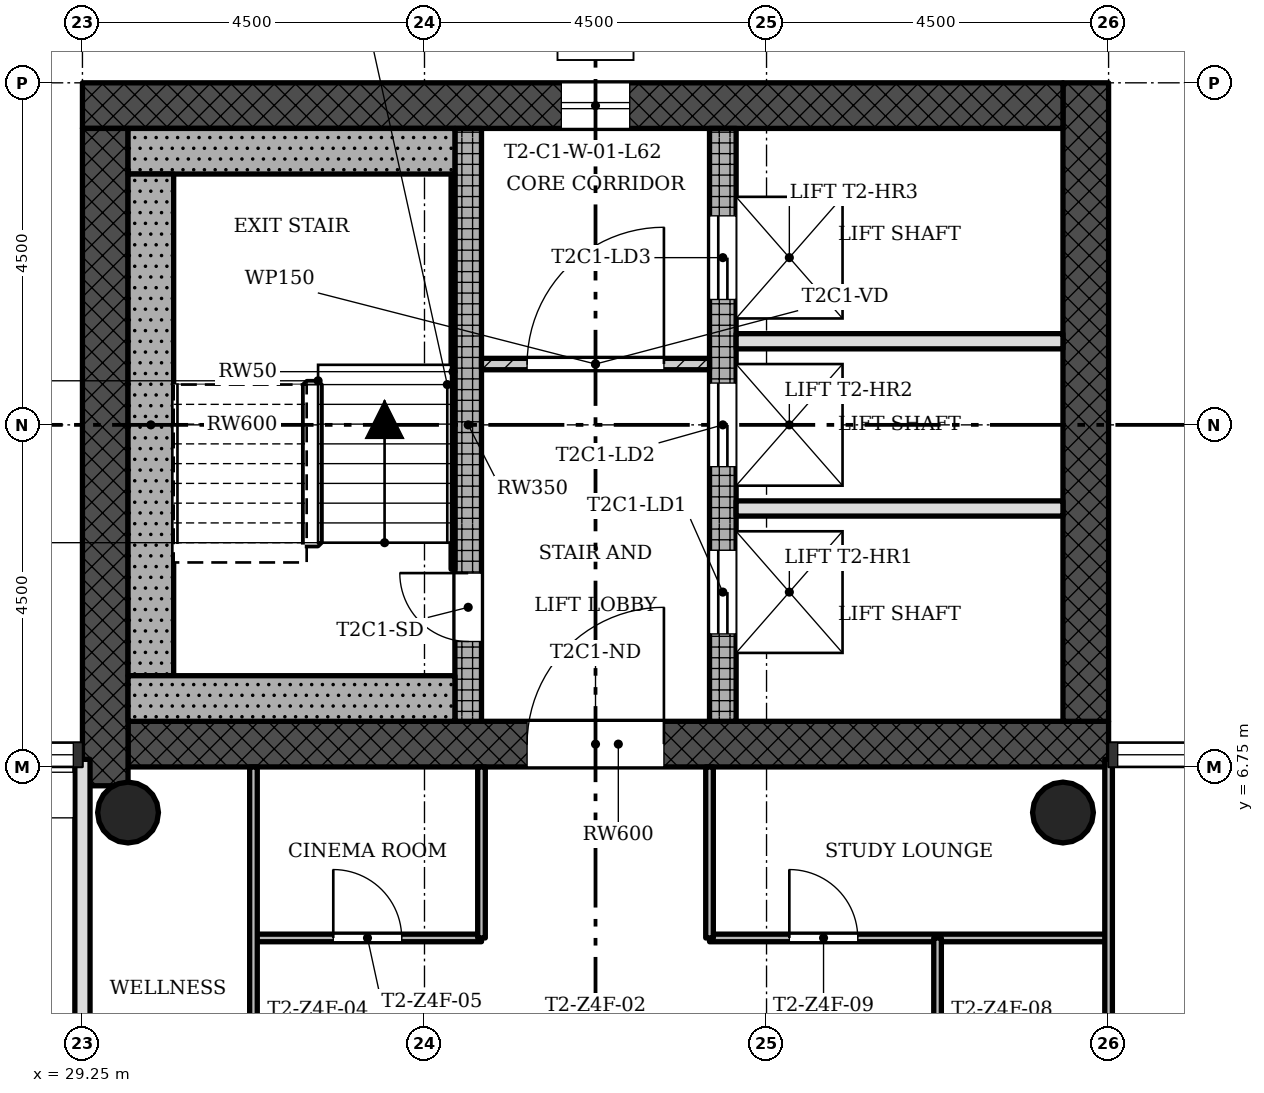
"""IFC4 building model, lengths in metres.
Left out: names, types, materials, properties, quantities, classifications, styles, units other than length and angle.
Written with IfcOpenShell. Run it as: python <this file> out.ifc"""

import sys

from ifc_helpers import new_model, si_unit, direction, frame, frame_2d, origin, origin_2d, place, context, subcontext, project, spatial, rectangle, hollow_circle, extrude, element, fill, save


model = new_model("IFC4")
c1 = context("Model", 3, precision=1e-05, world=origin(), true_north=direction((0.0, 1.0)))
c2 = subcontext(c1, "Body", "Model", "MODEL_VIEW")
j1 = project(units=[si_unit("LENGTHUNIT", "METRE"), si_unit("PLANEANGLEUNIT", "RADIAN")], contexts=[c1])
p1 = place(None, origin())
s1 = spatial("IfcSite", under=j1, at=p1, CompositionType="ELEMENT")
p2 = place(p1, origin())
s2 = spatial("IfcBuilding", under=s1, at=p2, CompositionType="ELEMENT")
p3 = place(p2, frame((0.0, 0.0, 223.2)))
s3 = spatial("IfcBuildingStorey", under=s2, at=p3, CompositionType="ELEMENT", Elevation=223.2)
p4 = place(p3, frame((29.85, 7.05, 0.0), z_axis=(0.0, 0.0, 1.0), x_axis=(1.0, 0.0, 0.0)))
e1 = element("IfcWall", 1, at=p4, inside=s3, PredefinedType="SHEAR", context=c2, shape_type="SweptSolid", body=[
    extrude(rectangle(XDim=12.9, YDim=0.6, at=frame_2d((6.45, 0.0))), origin(), (0.0, 0.0, 1.0), 3.4),
])
p5 = place(p4, frame((5.25, 0.0, 0.0)))
e2 = element("IfcOpeningElement", 2, at=p5, cuts=e1, PredefinedType="OPENING", context=c2, shape_type="SweptSolid", body=[
    extrude(rectangle(XDim=1.8, YDim=2.1, at=frame_2d((0.9, 1.05))), frame((0.0, 0.31, 0.0), z_axis=(0.0, -1.0, 0.0), x_axis=(1.0, 0.0, 0.0)), (0.0, 0.0, 1.0), 0.62),
])
p6 = place(p3, frame((42.45, 7.35, 0.0), z_axis=(0.0, 0.0, 1.0), x_axis=(0.0, 1.0, 0.0)))
e3 = element("IfcWall", 3, at=p6, inside=s3, PredefinedType="SHEAR", context=c2, shape_type="SweptSolid", body=[
    extrude(rectangle(XDim=8.4, YDim=0.6, at=frame_2d((4.2, 0.0))), origin(), (0.0, 0.0, 1.0), 3.4),
])
p7 = place(p3, frame((42.15, 15.45, 0.0), z_axis=(0.0, 0.0, 1.0), x_axis=(-1.0, 0.0, 0.0)))
e4 = element("IfcWall", 4, at=p7, inside=s3, PredefinedType="SHEAR", context=c2, shape_type="SweptSolid", body=[
    extrude(rectangle(XDim=12.9, YDim=0.6, at=frame_2d((6.45, 0.0))), origin(), (0.0, 0.0, 1.0), 3.4),
])
p8 = place(p7, frame((5.7, 0.0, 0.45)))
e5 = element("IfcOpeningElement", 5, at=p8, cuts=e4, PredefinedType="OPENING", context=c2, shape_type="SweptSolid", body=[
    extrude(rectangle(XDim=0.9, YDim=2.4, at=frame_2d((0.45, 1.2))), frame((0.0, 0.31, 0.0), z_axis=(0.0, -1.0, 0.0), x_axis=(1.0, 0.0, 0.0)), (0.0, 0.0, 1.0), 0.62),
])
p9 = place(p3, frame((29.55, 15.15, 0.0), z_axis=(0.0, 0.0, 1.0), x_axis=(0.0, -1.0, 0.0)))
e6 = element("IfcWall", 6, at=p9, inside=s3, PredefinedType="SHEAR", context=c2, shape_type="SweptSolid", body=[
    extrude(rectangle(XDim=8.648, YDim=0.6, at=frame_2d((4.324, 0.0))), origin(), (0.0, 0.0, 1.0), 3.4),
])
p10 = place(p3, frame((34.325, 7.35, 0.0), z_axis=(0.0, 0.0, 1.0), x_axis=(0.0, 1.0, 0.0)))
e7 = element("IfcWall", 7, at=p10, inside=s3, PredefinedType="SHEAR", context=c2, shape_type="SweptSolid", body=[
    extrude(rectangle(XDim=7.8, YDim=0.35, at=frame_2d((3.9, 0.0))), origin(), (0.0, 0.0, 1.0), 3.4),
])
p11 = place(p10, frame((1.05, 0.0, 0.0)))
e8 = element("IfcOpeningElement", 8, at=p11, cuts=e7, PredefinedType="OPENING", context=c2, shape_type="SweptSolid", body=[
    extrude(rectangle(XDim=0.9, YDim=2.1, at=frame_2d((0.45, 1.05))), frame((0.0, 0.185, 0.0), z_axis=(0.0, -1.0, 0.0), x_axis=(1.0, 0.0, 0.0)), (0.0, 0.0, 1.0), 0.37),
])
p12 = place(p3, frame((37.675, 7.35, 0.0), z_axis=(0.0, 0.0, 1.0), x_axis=(0.0, 1.0, 0.0)))
e9 = element("IfcWall", 9, at=p12, inside=s3, PredefinedType="SHEAR", context=c2, shape_type="SweptSolid", body=[
    extrude(rectangle(XDim=7.8, YDim=0.35, at=frame_2d((3.9, 0.0))), origin(), (0.0, 0.0, 1.0), 3.4),
])
p13 = place(p12, frame((1.15, 0.0, 0.0)))
e10 = element("IfcOpeningElement", 10, at=p13, cuts=e9, PredefinedType="OPENING", context=c2, shape_type="SweptSolid", body=[
    extrude(rectangle(XDim=1.1, YDim=2.1, at=frame_2d((0.55, 1.05))), frame((0.0, 0.185, 0.0), z_axis=(0.0, -1.0, 0.0), x_axis=(1.0, 0.0, 0.0)), (0.0, 0.0, 1.0), 0.37),
])
p14 = place(p12, frame((3.35, 0.0, 0.0)))
e11 = element("IfcOpeningElement", 11, at=p14, cuts=e9, PredefinedType="OPENING", context=c2, shape_type="SweptSolid", body=[
    extrude(rectangle(XDim=1.1, YDim=2.1, at=frame_2d((0.55, 1.05))), frame((0.0, 0.185, 0.0), z_axis=(0.0, -1.0, 0.0), x_axis=(1.0, 0.0, 0.0)), (0.0, 0.0, 1.0), 0.37),
])
p15 = place(p12, frame((5.55, 0.0, 0.0)))
e12 = element("IfcOpeningElement", 12, at=p15, cuts=e9, PredefinedType="OPENING", context=c2, shape_type="SweptSolid", body=[
    extrude(rectangle(XDim=1.1, YDim=2.1, at=frame_2d((0.55, 1.05))), frame((0.0, 0.185, 0.0), z_axis=(0.0, -1.0, 0.0), x_axis=(1.0, 0.0, 0.0)), (0.0, 0.0, 1.0), 0.37),
])
for number, where, z_axis, x_axis in (
    (13, (42.15, 6.15, 0.0), (0.0, 0.0, 1.0), (1.0, 0.0, 0.0)),
    (14, (29.85, 6.15, 0.0), (0.0, 0.0, 1.0), (1.0, 0.0, 0.0)),
):
    element("IfcColumn", number, at=place(p3, frame(where, z_axis=z_axis, x_axis=x_axis)), inside=s3, PredefinedType="COLUMN", context=c2, shape_type="SweptSolid", body=[
        extrude(hollow_circle(Radius=0.4, WallThickness=0.028, at=origin_2d()), origin(), (0.0, 0.0, 1.0), 3.4),
    ])
p16 = place(p3, frame((37.5, 12.05, 0.0), z_axis=(0.0, 0.0, 1.0), x_axis=(-1.0, 0.0, 0.0)))
e15 = element("IfcWall", 15, at=p16, inside=s3, PredefinedType="PARTITIONING", context=c2, shape_type="SweptSolid", body=[
    extrude(rectangle(XDim=3.0, YDim=0.15, at=frame_2d((1.5, 0.0))), origin(), (0.0, 0.0, 1.0), 3.0),
])
p17 = place(p16, frame((0.6, 0.0, 0.0)))
e16 = element("IfcOpeningElement", 16, at=p17, cuts=e15, PredefinedType="OPENING", context=c2, shape_type="SweptSolid", body=[
    extrude(rectangle(XDim=1.8, YDim=2.1, at=frame_2d((0.9, 1.05))), frame((0.0, 0.085, 0.0), z_axis=(0.0, -1.0, 0.0), x_axis=(1.0, 0.0, 0.0)), (0.0, 0.0, 1.0), 0.17),
])
for number, where, z_axis, x_axis in (
    (17, (42.15, 10.15, 0.0), (0.0, 0.0, 1.0), (-1.0, 0.0, 0.0)),
    (18, (42.15, 12.35, 0.0), (0.0, 0.0, 1.0), (-1.0, 0.0, 0.0)),
):
    element("IfcWall", number, at=place(p3, frame(where, z_axis=z_axis, x_axis=x_axis)), inside=s3, PredefinedType="SOLIDWALL", context=c2, shape_type="SweptSolid", body=[
        extrude(rectangle(XDim=4.3, YDim=0.2, at=frame_2d((2.15, 0.0))), origin(), (0.0, 0.0, 1.0), 3.0),
    ])
p18 = place(p3, frame((42.75, 4.5, 0.0), z_axis=(0.0, 0.0, 1.0), x_axis=(-1.0, 0.0, 0.0)))
e19 = element("IfcWall", 19, at=p18, inside=s3, PredefinedType="PARTITIONING", context=c2, shape_type="SweptSolid", body=[
    extrude(rectangle(XDim=5.25, YDim=0.1, at=frame_2d((2.625, 0.0))), origin(), (0.0, 0.0, 1.0), 3.0),
])
p19 = place(p18, frame((3.3, 0.0, 0.0)))
e20 = element("IfcOpeningElement", 20, at=p19, cuts=e19, PredefinedType="OPENING", context=c2, shape_type="SweptSolid", body=[
    extrude(rectangle(XDim=0.9, YDim=2.1, at=frame_2d((0.45, 1.05))), frame((0.0, 0.06, 0.0), z_axis=(0.0, -1.0, 0.0), x_axis=(1.0, 0.0, 0.0)), (0.0, 0.0, 1.0), 0.12),
])
p20 = place(p3, frame((34.5, 4.5, 0.0), z_axis=(0.0, 0.0, 1.0), x_axis=(-1.0, 0.0, 0.0)))
e21 = element("IfcWall", 21, at=p20, inside=s3, PredefinedType="PARTITIONING", context=c2, shape_type="SweptSolid", body=[
    extrude(rectangle(XDim=3.0, YDim=0.1, at=frame_2d((1.5, 0.0))), origin(), (0.0, 0.0, 1.0), 3.0),
])
p21 = place(p20, frame((1.05, 0.0, 0.0)))
e22 = element("IfcOpeningElement", 22, at=p21, cuts=e21, PredefinedType="OPENING", context=c2, shape_type="SweptSolid", body=[
    extrude(rectangle(XDim=0.9, YDim=2.1, at=frame_2d((0.45, 1.05))), frame((0.0, 0.06, 0.0), z_axis=(0.0, -1.0, 0.0), x_axis=(1.0, 0.0, 0.0)), (0.0, 0.0, 1.0), 0.12),
])
p22 = place(p3, frame((42.75, 0.9, 0.0), z_axis=(0.0, 0.0, 1.0), x_axis=(0.0, 1.0, 0.0)))
e23 = element("IfcWall", 23, at=p22, inside=s3, PredefinedType="PARTITIONING", context=c2, shape_type="SweptSolid", body=[
    extrude(rectangle(XDim=5.95, YDim=0.1, at=frame_2d((2.975, 0.0))), origin(), (0.0, 0.0, 1.0), 3.0),
])
p23 = place(p3, frame((40.5, 0.9, 0.0), z_axis=(0.0, 0.0, 1.0), x_axis=(0.0, 1.0, 0.0)))
e24 = element("IfcWall", 24, at=p23, inside=s3, PredefinedType="PARTITIONING", context=c2, shape_type="SweptSolid", body=[
    extrude(rectangle(XDim=3.6, YDim=0.1, at=frame_2d((1.8, 0.0))), origin(), (0.0, 0.0, 1.0), 3.0),
])
p24 = place(p23, frame((1.35, 0.0, 0.0)))
e25 = element("IfcOpeningElement", 25, at=p24, cuts=e24, PredefinedType="OPENING", context=c2, shape_type="SweptSolid", body=[
    extrude(rectangle(XDim=0.9, YDim=2.1, at=frame_2d((0.45, 1.05))), frame((0.0, 0.06, 0.0), z_axis=(0.0, -1.0, 0.0), x_axis=(1.0, 0.0, 0.0)), (0.0, 0.0, 1.0), 0.12),
])
for number, where, z_axis, x_axis in (
    (26, (37.5, 4.5, 0.0), (0.0, 0.0, 1.0), (0.0, 1.0, 0.0)),
    (27, (34.5, 4.5, 0.0), (0.0, 0.0, 1.0), (0.0, 1.0, 0.0)),
):
    element("IfcWall", number, at=place(p3, frame(where, z_axis=z_axis, x_axis=x_axis)), inside=s3, PredefinedType="PARTITIONING", context=c2, shape_type="SweptSolid", body=[
        extrude(rectangle(XDim=2.25, YDim=0.1, at=frame_2d((1.125, 0.0))), origin(), (0.0, 0.0, 1.0), 3.0),
    ])
p25 = place(p3, frame((31.5, 0.9, 0.0), z_axis=(0.0, 0.0, 1.0), x_axis=(0.0, 1.0, 0.0)))
e28 = element("IfcWall", 28, at=p25, inside=s3, PredefinedType="PARTITIONING", context=c2, shape_type="SweptSolid", body=[
    extrude(rectangle(XDim=5.85, YDim=0.1, at=frame_2d((2.925, 0.0))), origin(), (0.0, 0.0, 1.0), 3.0),
])
p26 = place(p25, frame((1.35, 0.0, 0.0)))
e29 = element("IfcOpeningElement", 29, at=p26, cuts=e28, PredefinedType="OPENING", context=c2, shape_type="SweptSolid", body=[
    extrude(rectangle(XDim=0.9, YDim=2.1, at=frame_2d((0.45, 1.05))), frame((0.0, 0.06, 0.0), z_axis=(0.0, -1.0, 0.0), x_axis=(1.0, 0.0, 0.0)), (0.0, 0.0, 1.0), 0.12),
])
p27 = place(p3, frame((29.25, -6.85, 0.0), z_axis=(0.0, 0.0, 1.0), x_axis=(0.0, 1.0, 0.0)))
e30 = element("IfcWall", 30, at=p27, inside=s3, PredefinedType="SOLIDWALL", context=c2, shape_type="SweptSolid", body=[
    extrude(rectangle(XDim=13.7, YDim=0.2, at=frame_2d((6.85, 0.0))), origin(), (0.0, 0.0, 1.0), 3.0),
])
p28 = place(p27, frame((6.4, 0.0, 0.0)))
e31 = element("IfcOpeningElement", 31, at=p28, cuts=e30, PredefinedType="OPENING", context=c2, shape_type="SweptSolid", body=[
    extrude(rectangle(XDim=0.9, YDim=2.1, at=frame_2d((0.45, 1.05))), frame((0.0, 0.11, 0.0), z_axis=(0.0, -1.0, 0.0), x_axis=(1.0, 0.0, 0.0)), (0.0, 0.0, 1.0), 0.22),
])
p29 = place(p3, frame((34.15, 14.85, 0.0), z_axis=(0.0, 0.0, 1.0), x_axis=(-1.0, 0.0, 0.0)))
e32 = element("IfcWall", 32, at=p29, inside=s3, PredefinedType="SHEAR", context=c2, shape_type="SweptSolid", body=[
    extrude(rectangle(XDim=4.3, YDim=0.6, at=frame_2d((2.15, 0.0))), origin(), (0.0, 0.0, 1.0), 3.4),
])
p30 = place(p3, frame((30.15, 7.95, 0.0), z_axis=(0.0, 0.0, 1.0), x_axis=(0.0, 1.0, 0.0)))
e33 = element("IfcWall", 33, at=p30, inside=s3, PredefinedType="SHEAR", context=c2, shape_type="SweptSolid", body=[
    extrude(rectangle(XDim=6.6, YDim=0.6, at=frame_2d((3.3, 0.0))), origin(), (0.0, 0.0, 1.0), 3.4),
])
p31 = place(p3, frame((34.15, 7.65, 0.0), z_axis=(0.0, 0.0, 1.0), x_axis=(-1.0, 0.0, 0.0)))
e34 = element("IfcWall", 34, at=p31, inside=s3, PredefinedType="SHEAR", context=c2, shape_type="SweptSolid", body=[
    extrude(rectangle(XDim=4.3, YDim=0.6, at=frame_2d((2.15, 0.0))), origin(), (0.0, 0.0, 1.0), 3.4),
])
p32 = place(p3, frame((34.125, 9.35, 0.0), z_axis=(0.0, 0.0, 1.0), x_axis=(0.0, 1.0, 0.0)))
e35 = element("IfcWall", 35, at=p32, inside=s3, PredefinedType="SHEAR", context=c2, shape_type="SweptSolid", body=[
    extrude(rectangle(XDim=5.2, YDim=0.05, at=frame_2d((2.6, 0.0))), origin(), (0.0, 0.0, 1.0), 3.4),
])
p33 = place(p8, origin())
e36 = element("IfcWindow", 36, at=p33, inside=s3, PartitioningType="SINGLE_PANEL", PredefinedType="WINDOW", context=c2, shape_type="SweptSolid", body=[
    extrude(rectangle(XDim=0.9, YDim=2.4, at=frame_2d((0.45, 1.2))), frame((0.0, 0.03, 0.0), z_axis=(0.0, -1.0, 0.0), x_axis=(1.0, 0.0, 0.0)), (0.0, 0.0, 1.0), 0.06),
])
fill(e5, e36)
p34 = place(p17, origin())
e37 = element("IfcDoor", 37, at=p34, inside=s3, OperationType="SINGLE_SWING_LEFT", PredefinedType="DOOR", context=c2, shape_type="SweptSolid", body=[
    extrude(rectangle(XDim=1.8, YDim=2.1, at=frame_2d((0.9, 1.05))), frame((0.0, 0.025, 0.0), z_axis=(0.0, -1.0, 0.0), x_axis=(1.0, 0.0, 0.0)), (0.0, 0.0, 1.0), 0.05),
])
fill(e16, e37)
p35 = place(p21, origin())
e38 = element("IfcDoor", 38, at=p35, inside=s3, OperationType="SINGLE_SWING_RIGHT", PredefinedType="DOOR", context=c2, shape_type="SweptSolid", body=[
    extrude(rectangle(XDim=0.9, YDim=2.1, at=frame_2d((0.45, 1.05))), frame((0.0, 0.025, 0.0), z_axis=(0.0, -1.0, 0.0), x_axis=(1.0, 0.0, 0.0)), (0.0, 0.0, 1.0), 0.05),
])
fill(e22, e38)
p36 = place(p19, origin())
e39 = element("IfcDoor", 39, at=p36, inside=s3, OperationType="SINGLE_SWING_RIGHT", PredefinedType="DOOR", context=c2, shape_type="SweptSolid", body=[
    extrude(rectangle(XDim=0.9, YDim=2.1, at=frame_2d((0.45, 1.05))), frame((0.0, 0.025, 0.0), z_axis=(0.0, -1.0, 0.0), x_axis=(1.0, 0.0, 0.0)), (0.0, 0.0, 1.0), 0.05),
])
fill(e20, e39)
p37 = place(p11, origin())
e40 = element("IfcDoor", 40, at=p37, inside=s3, OperationType="SINGLE_SWING_LEFT", PredefinedType="DOOR", context=c2, shape_type="SweptSolid", body=[
    extrude(rectangle(XDim=0.9, YDim=2.1, at=frame_2d((0.45, 1.05))), frame((0.0, 0.025, 0.0), z_axis=(0.0, -1.0, 0.0), x_axis=(1.0, 0.0, 0.0)), (0.0, 0.0, 1.0), 0.05),
])
fill(e8, e40)
p38 = place(p13, origin())
e41 = element("IfcDoor", 41, at=p38, inside=s3, OperationType="SLIDING_TO_LEFT", PredefinedType="DOOR", context=c2, shape_type="SweptSolid", body=[
    extrude(rectangle(XDim=1.1, YDim=2.1, at=frame_2d((0.55, 1.05))), frame((0.0, 0.025, 0.0), z_axis=(0.0, -1.0, 0.0), x_axis=(1.0, 0.0, 0.0)), (0.0, 0.0, 1.0), 0.05),
])
fill(e10, e41)
p39 = place(p14, origin())
e42 = element("IfcDoor", 42, at=p39, inside=s3, OperationType="SLIDING_TO_LEFT", PredefinedType="DOOR", context=c2, shape_type="SweptSolid", body=[
    extrude(rectangle(XDim=1.1, YDim=2.1, at=frame_2d((0.55, 1.05))), frame((0.0, 0.025, 0.0), z_axis=(0.0, -1.0, 0.0), x_axis=(1.0, 0.0, 0.0)), (0.0, 0.0, 1.0), 0.05),
])
fill(e11, e42)
p40 = place(p15, origin())
e43 = element("IfcDoor", 43, at=p40, inside=s3, OperationType="SLIDING_TO_LEFT", PredefinedType="DOOR", context=c2, shape_type="SweptSolid", body=[
    extrude(rectangle(XDim=1.1, YDim=2.1, at=frame_2d((0.55, 1.05))), frame((0.0, 0.025, 0.0), z_axis=(0.0, -1.0, 0.0), x_axis=(1.0, 0.0, 0.0)), (0.0, 0.0, 1.0), 0.05),
])
fill(e12, e43)
p41 = place(p5, origin())
e44 = element("IfcDoor", 44, at=p41, inside=s3, OperationType="SINGLE_SWING_LEFT", PredefinedType="DOOR", context=c2, shape_type="SweptSolid", body=[
    extrude(rectangle(XDim=1.8, YDim=2.1, at=frame_2d((0.9, 1.05))), frame((0.0, 0.025, 0.0), z_axis=(0.0, -1.0, 0.0), x_axis=(1.0, 0.0, 0.0)), (0.0, 0.0, 1.0), 0.05),
])
fill(e2, e44)
save(model, sys.argv[1])
